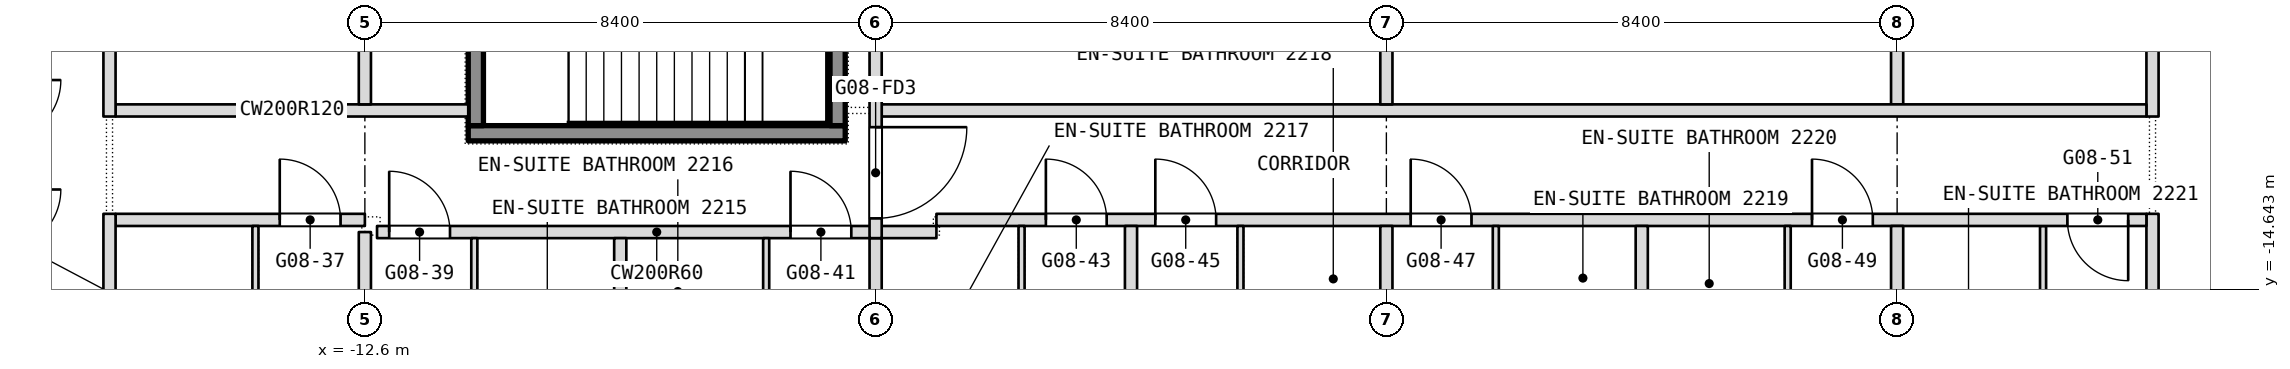
"""IFC4 building model, lengths in metres.
Left out: names, types, materials, properties, quantities, classifications, styles, units other than length and angle.
Written with IfcOpenShell. Run it as: python <this file> out.ifc"""

import sys

from ifc_helpers import new_model, si_unit, direction, frame, frame_2d, origin, place, context, subcontext, project, spatial, rectangle, extrude, element, fill, save


model = new_model("IFC4")
c1 = context("Model", 3, precision=1e-05, world=origin(), true_north=direction((0.0, 1.0)))
c2 = subcontext(c1, "Body", "Model", "MODEL_VIEW")
j1 = project(units=[si_unit("LENGTHUNIT", "METRE"), si_unit("PLANEANGLEUNIT", "RADIAN")], contexts=[c1])
p1 = place(None, origin())
s1 = spatial("IfcSite", under=j1, at=p1, CompositionType="ELEMENT")
p2 = place(p1, origin())
s2 = spatial("IfcBuilding", under=s1, at=p2, CompositionType="ELEMENT")
p3 = place(p2, frame((0.0, 0.0, 104.9)))
s3 = spatial("IfcBuildingStorey", under=s2, at=p3, CompositionType="ELEMENT", Elevation=104.9)
p4 = place(p3, frame((16.8, -22.186, 0.0), z_axis=(0.0, 0.0, 1.0), x_axis=(0.0, 1.0, 0.0)))
e1 = element("IfcWall", 1, at=p4, inside=s3, PredefinedType="PARTITIONING", context=c2, shape_type="SweptSolid", body=[
    extrude(rectangle(XDim=8.786, YDim=0.2, at=frame_2d((4.393, 0.0))), origin(), (0.0, 0.0, 1.0), 3.34),
])
p5 = place(p3, frame((16.8, -11.8, 0.0), z_axis=(0.0, 0.0, 1.0), x_axis=(0.0, 1.0, 0.0)))
e2 = element("IfcWall", 2, at=p5, inside=s3, PredefinedType="PARTITIONING", context=c2, shape_type="SweptSolid", body=[
    extrude(rectangle(XDim=9.9, YDim=0.2, at=frame_2d((4.95, 0.0))), origin(), (0.0, 0.0, 1.0), 3.34),
])
p6 = place(p3, frame((15.0, -16.85, 0.0), z_axis=(0.0, 0.0, 1.0), x_axis=(0.0, 1.0, 0.0)))
e3 = element("IfcWall", 3, at=p6, inside=s3, PredefinedType="PARTITIONING", context=c2, shape_type="SweptSolid", body=[
    extrude(rectangle(XDim=3.25, YDim=0.1, at=frame_2d((1.625, 0.0))), origin(), (0.0, 0.0, 1.0), 3.34),
])
p7 = place(p3, frame((-12.4, -13.7, 0.0), z_axis=(0.0, 0.0, 1.0), x_axis=(1.0, 0.0, 0.0)))
e4 = element("IfcWall", 4, at=p7, inside=s3, PredefinedType="PARTITIONING", context=c2, shape_type="SweptSolid", body=[
    extrude(rectangle(XDim=9.2, YDim=0.2, at=frame_2d((4.6, 0.0))), origin(), (0.0, 0.0, 1.0), 3.34),
])
p8 = place(p7, frame((0.2, 0.0, 0.0)))
e5 = element("IfcOpeningElement", 5, at=p8, cuts=e4, PredefinedType="OPENING", context=c2, shape_type="SweptSolid", body=[
    extrude(rectangle(XDim=1.0, YDim=2.1, at=frame_2d((0.5, 1.05))), frame((0.0, 0.1, 0.0), z_axis=(0.0, -1.0, 0.0), x_axis=(1.0, 0.0, 0.0)), (0.0, 0.0, 1.0), 0.2),
])
p9 = place(p7, frame((6.8, 0.0, 0.0)))
e6 = element("IfcOpeningElement", 6, at=p9, cuts=e4, PredefinedType="OPENING", context=c2, shape_type="SweptSolid", body=[
    extrude(rectangle(XDim=1.0, YDim=2.1, at=frame_2d((0.5, 1.05))), frame((0.0, 0.1, 0.0), z_axis=(0.0, -1.0, 0.0), x_axis=(1.0, 0.0, 0.0)), (0.0, 0.0, 1.0), 0.2),
])
p10 = place(p3, frame((-16.7, -13.5, 0.0), z_axis=(0.0, 0.0, 1.0), x_axis=(1.0, 0.0, 0.0)))
e7 = element("IfcWall", 7, at=p10, inside=s3, PredefinedType="PARTITIONING", context=c2, shape_type="SweptSolid", body=[
    extrude(rectangle(XDim=4.1, YDim=0.2, at=frame_2d((2.05, 0.0))), origin(), (0.0, 0.0, 1.0), 3.34),
])
p11 = place(p10, frame((2.7, 0.0, 0.0)))
e8 = element("IfcOpeningElement", 8, at=p11, cuts=e7, PredefinedType="OPENING", context=c2, shape_type="SweptSolid", body=[
    extrude(rectangle(XDim=1.0, YDim=2.1, at=frame_2d((0.5, 1.05))), frame((0.0, 0.1, 0.0), z_axis=(0.0, -1.0, 0.0), x_axis=(1.0, 0.0, 0.0)), (0.0, 0.0, 1.0), 0.2),
])
p12 = place(p3, frame((-3.2, -13.5, 0.0), z_axis=(0.0, 0.0, 1.0), x_axis=(1.0, 0.0, 0.0)))
e9 = element("IfcWall", 9, at=p12, inside=s3, PredefinedType="PARTITIONING", context=c2, shape_type="SweptSolid", body=[
    extrude(rectangle(XDim=19.9, YDim=0.2, at=frame_2d((9.95, 0.0))), origin(), (0.0, 0.0, 1.0), 3.34),
])
p13 = place(p12, frame((1.8, 0.0, 0.0)))
e10 = element("IfcOpeningElement", 10, at=p13, cuts=e9, PredefinedType="OPENING", context=c2, shape_type="SweptSolid", body=[
    extrude(rectangle(XDim=1.0, YDim=2.1, at=frame_2d((0.5, 1.05))), frame((0.0, 0.1, 0.0), z_axis=(0.0, -1.0, 0.0), x_axis=(1.0, 0.0, 0.0)), (0.0, 0.0, 1.0), 0.2),
])
p14 = place(p12, frame((3.6, 0.0, 0.0)))
e11 = element("IfcOpeningElement", 11, at=p14, cuts=e9, PredefinedType="OPENING", context=c2, shape_type="SweptSolid", body=[
    extrude(rectangle(XDim=1.0, YDim=2.1, at=frame_2d((0.5, 1.05))), frame((0.0, 0.1, 0.0), z_axis=(0.0, -1.0, 0.0), x_axis=(1.0, 0.0, 0.0)), (0.0, 0.0, 1.0), 0.2),
])
p15 = place(p12, frame((7.8, 0.0, 0.0)))
e12 = element("IfcOpeningElement", 12, at=p15, cuts=e9, PredefinedType="OPENING", context=c2, shape_type="SweptSolid", body=[
    extrude(rectangle(XDim=1.0, YDim=2.1, at=frame_2d((0.5, 1.05))), frame((0.0, 0.1, 0.0), z_axis=(0.0, -1.0, 0.0), x_axis=(1.0, 0.0, 0.0)), (0.0, 0.0, 1.0), 0.2),
])
p16 = place(p12, frame((14.4, 0.0, 0.0)))
e13 = element("IfcOpeningElement", 13, at=p16, cuts=e9, PredefinedType="OPENING", context=c2, shape_type="SweptSolid", body=[
    extrude(rectangle(XDim=1.0, YDim=2.1, at=frame_2d((0.5, 1.05))), frame((0.0, 0.1, 0.0), z_axis=(0.0, -1.0, 0.0), x_axis=(1.0, 0.0, 0.0)), (0.0, 0.0, 1.0), 0.2),
])
p17 = place(p12, frame((18.6, 0.0, 0.0)))
e14 = element("IfcOpeningElement", 14, at=p17, cuts=e9, PredefinedType="OPENING", context=c2, shape_type="SweptSolid", body=[
    extrude(rectangle(XDim=1.0, YDim=2.1, at=frame_2d((0.5, 1.05))), frame((0.0, 0.1, 0.0), z_axis=(0.0, -1.0, 0.0), x_axis=(1.0, 0.0, 0.0)), (0.0, 0.0, 1.0), 0.2),
])
p18 = place(p3, frame((12.6, -21.175, 0.0), z_axis=(0.0, 0.0, 1.0), x_axis=(0.0, 1.0, 0.0)))
e15 = element("IfcWall", 15, at=p18, inside=s3, PredefinedType="PARTITIONING", context=c2, shape_type="SweptSolid", body=[
    extrude(rectangle(XDim=7.575, YDim=0.2, at=frame_2d((3.788, 0.0))), origin(), (0.0, 0.0, 1.0), 3.34),
])
p19 = place(p3, frame((12.6, -11.6, 0.0), z_axis=(0.0, 0.0, 1.0), x_axis=(0.0, 1.0, 0.0)))
e16 = element("IfcWall", 16, at=p19, inside=s3, PredefinedType="PARTITIONING", context=c2, shape_type="SweptSolid", body=[
    extrude(rectangle(XDim=3.9, YDim=0.2, at=frame_2d((1.95, 0.0))), origin(), (0.0, 0.0, 1.0), 3.34),
])
p20 = place(p3, frame((-16.7, -11.7, 0.0), z_axis=(0.0, 0.0, 1.0), x_axis=(1.0, 0.0, 0.0)))
e17 = element("IfcWall", 17, at=p20, inside=s3, PredefinedType="PARTITIONING", context=c2, shape_type="SweptSolid", body=[
    extrude(rectangle(XDim=5.8, YDim=0.2, at=frame_2d((2.9, 0.0))), origin(), (0.0, 0.0, 1.0), 3.34),
])
p21 = place(p3, frame((-4.1, -11.7, 0.0), z_axis=(0.0, 0.0, 1.0), x_axis=(1.0, 0.0, 0.0)))
e18 = element("IfcWall", 18, at=p21, inside=s3, PredefinedType="PARTITIONING", context=c2, shape_type="SweptSolid", body=[
    extrude(rectangle(XDim=20.8, YDim=0.2, at=frame_2d((10.4, 0.0))), origin(), (0.0, 0.0, 1.0), 3.34),
])
p22 = place(p3, frame((10.8, -16.45, 0.0), z_axis=(0.0, 0.0, 1.0), x_axis=(0.0, 1.0, 0.0)))
e19 = element("IfcWall", 19, at=p22, inside=s3, PredefinedType="PARTITIONING", context=c2, shape_type="SweptSolid", body=[
    extrude(rectangle(XDim=2.85, YDim=0.1, at=frame_2d((1.425, 0.0))), origin(), (0.0, 0.0, 1.0), 3.34),
])
p23 = place(p3, frame((8.4, -23.3, 0.0), z_axis=(0.0, 0.0, 1.0), x_axis=(0.0, 1.0, 0.0)))
e20 = element("IfcWall", 20, at=p23, inside=s3, PredefinedType="PARTITIONING", context=c2, shape_type="SweptSolid", body=[
    extrude(rectangle(XDim=9.7, YDim=0.2, at=frame_2d((4.85, 0.0))), origin(), (0.0, 0.0, 1.0), 3.34),
])
p24 = place(p3, frame((6.0, -16.35, 0.0), z_axis=(0.0, 0.0, 1.0), x_axis=(0.0, 1.0, 0.0)))
e21 = element("IfcWall", 21, at=p24, inside=s3, PredefinedType="PARTITIONING", context=c2, shape_type="SweptSolid", body=[
    extrude(rectangle(XDim=2.75, YDim=0.1, at=frame_2d((1.375, 0.0))), origin(), (0.0, 0.0, 1.0), 3.34),
])
p25 = place(p3, frame((4.2, -23.3, 0.0), z_axis=(0.0, 0.0, 1.0), x_axis=(0.0, 1.0, 0.0)))
e22 = element("IfcWall", 22, at=p25, inside=s3, PredefinedType="PARTITIONING", context=c2, shape_type="SweptSolid", body=[
    extrude(rectangle(XDim=9.7, YDim=0.2, at=frame_2d((4.85, 0.0))), origin(), (0.0, 0.0, 1.0), 3.34),
])
p26 = place(p3, frame((4.2, -11.6, 0.0), z_axis=(0.0, 0.0, 1.0), x_axis=(0.0, 1.0, 0.0)))
e23 = element("IfcWall", 23, at=p26, inside=s3, PredefinedType="PARTITIONING", context=c2, shape_type="SweptSolid", body=[
    extrude(rectangle(XDim=9.7, YDim=0.2, at=frame_2d((4.85, 0.0))), origin(), (0.0, 0.0, 1.0), 3.34),
])
p27 = place(p3, frame((1.8, -17.45, 0.0), z_axis=(0.0, 0.0, 1.0), x_axis=(0.0, 1.0, 0.0)))
e24 = element("IfcWall", 24, at=p27, inside=s3, PredefinedType="PARTITIONING", context=c2, shape_type="SweptSolid", body=[
    extrude(rectangle(XDim=3.85, YDim=0.1, at=frame_2d((1.925, 0.0))), origin(), (0.0, 0.0, 1.0), 3.34),
])
p28 = place(p27, frame((1.355, 0.0, 0.0)))
e25 = element("IfcOpeningElement", 25, at=p28, cuts=e24, PredefinedType="OPENING", context=c2, shape_type="SweptSolid", body=[
    extrude(rectangle(XDim=0.9, YDim=2.1, at=frame_2d((0.45, 1.05))), frame((0.0, 0.05, 0.0), z_axis=(0.0, -1.0, 0.0), x_axis=(1.0, 0.0, 0.0)), (0.0, 0.0, 1.0), 0.1),
])
p29 = place(p3, frame((0.0, -23.3, 0.0), z_axis=(0.0, 0.0, 1.0), x_axis=(0.0, 1.0, 0.0)))
e26 = element("IfcWall", 26, at=p29, inside=s3, PredefinedType="PARTITIONING", context=c2, shape_type="SweptSolid", body=[
    extrude(rectangle(XDim=9.7, YDim=0.2, at=frame_2d((4.85, 0.0))), origin(), (0.0, 0.0, 1.0), 3.34),
])
p30 = place(p3, frame((-1.8, -17.35, 0.0), z_axis=(0.0, 0.0, 1.0), x_axis=(0.0, 1.0, 0.0)))
e27 = element("IfcWall", 27, at=p30, inside=s3, PredefinedType="PARTITIONING", context=c2, shape_type="SweptSolid", body=[
    extrude(rectangle(XDim=3.75, YDim=0.1, at=frame_2d((1.875, 0.0))), origin(), (0.0, 0.0, 1.0), 3.34),
])
p31 = place(p3, frame((-4.2, -23.3, 0.0), z_axis=(0.0, 0.0, 1.0), x_axis=(0.0, 1.0, 0.0)))
e28 = element("IfcWall", 28, at=p31, inside=s3, PredefinedType="PARTITIONING", context=c2, shape_type="SweptSolid", body=[
    extrude(rectangle(XDim=9.5, YDim=0.2, at=frame_2d((4.75, 0.0))), origin(), (0.0, 0.0, 1.0), 3.34),
])
p32 = place(p3, frame((-4.2, -13.8, 0.0), z_axis=(0.0, 0.0, 1.0), x_axis=(0.0, 1.0, 0.0)))
e29 = element("IfcWall", 29, at=p32, inside=s3, PredefinedType="PARTITIONING", context=c2, shape_type="SweptSolid", body=[
    extrude(rectangle(XDim=13.8, YDim=0.2, at=frame_2d((6.9, 0.0))), origin(), (0.0, 0.0, 1.0), 3.34),
])
p33 = place(p32, frame((12.15, 0.0, 0.0)))
e30 = element("IfcOpeningElement", 30, at=p33, cuts=e29, PredefinedType="OPENING", context=c2, shape_type="SweptSolid", body=[
    extrude(rectangle(XDim=1.5, YDim=2.1, at=frame_2d((0.75, 1.05))), frame((0.0, 0.1, 0.0), z_axis=(0.0, -1.0, 0.0), x_axis=(1.0, 0.0, 0.0)), (0.0, 0.0, 1.0), 0.2),
])
p34 = place(p32, frame((0.325, 0.0, 0.0)))
e31 = element("IfcOpeningElement", 31, at=p34, cuts=e29, PredefinedType="OPENING", context=c2, shape_type="SweptSolid", body=[
    extrude(rectangle(XDim=1.5, YDim=2.1, at=frame_2d((0.75, 1.05))), frame((0.0, 0.1, 0.0), z_axis=(0.0, -1.0, 0.0), x_axis=(1.0, 0.0, 0.0)), (0.0, 0.0, 1.0), 0.2),
])
p35 = place(p3, frame((-6.0, -16.45, 0.0), z_axis=(0.0, 0.0, 1.0), x_axis=(0.0, 1.0, 0.0)))
e32 = element("IfcWall", 32, at=p35, inside=s3, PredefinedType="PARTITIONING", context=c2, shape_type="SweptSolid", body=[
    extrude(rectangle(XDim=2.65, YDim=0.1, at=frame_2d((1.325, 0.0))), origin(), (0.0, 0.0, 1.0), 3.34),
])
p36 = place(p3, frame((-8.4, -23.3, 0.0), z_axis=(0.0, 0.0, 1.0), x_axis=(0.0, 1.0, 0.0)))
e33 = element("IfcWall", 33, at=p36, inside=s3, PredefinedType="PARTITIONING", context=c2, shape_type="SweptSolid", body=[
    extrude(rectangle(XDim=9.5, YDim=0.2, at=frame_2d((4.75, 0.0))), origin(), (0.0, 0.0, 1.0), 3.34),
])
p37 = place(p3, frame((-10.8, -17.65, 0.0), z_axis=(0.0, 0.0, 1.0), x_axis=(0.0, 1.0, 0.0)))
e34 = element("IfcWall", 34, at=p37, inside=s3, PredefinedType="PARTITIONING", context=c2, shape_type="SweptSolid", body=[
    extrude(rectangle(XDim=3.85, YDim=0.1, at=frame_2d((1.925, 0.0))), origin(), (0.0, 0.0, 1.0), 3.34),
])
p38 = place(p3, frame((-12.6, -21.175, 0.0), z_axis=(0.0, 0.0, 1.0), x_axis=(0.0, 1.0, 0.0)))
e35 = element("IfcWall", 35, at=p38, inside=s3, PredefinedType="PARTITIONING", context=c2, shape_type="SweptSolid", body=[
    extrude(rectangle(XDim=7.475, YDim=0.2, at=frame_2d((3.738, 0.0))), origin(), (0.0, 0.0, 1.0), 3.34),
])
p39 = place(p3, frame((-12.6, -11.6, 0.0), z_axis=(0.0, 0.0, 1.0), x_axis=(0.0, 1.0, 0.0)))
e36 = element("IfcWall", 36, at=p39, inside=s3, PredefinedType="PARTITIONING", context=c2, shape_type="SweptSolid", body=[
    extrude(rectangle(XDim=9.7, YDim=0.2, at=frame_2d((4.85, 0.0))), origin(), (0.0, 0.0, 1.0), 3.34),
])
p40 = place(p3, frame((-14.4, -17.65, 0.0), z_axis=(0.0, 0.0, 1.0), x_axis=(0.0, 1.0, 0.0)))
e37 = element("IfcWall", 37, at=p40, inside=s3, PredefinedType="PARTITIONING", context=c2, shape_type="SweptSolid", body=[
    extrude(rectangle(XDim=4.05, YDim=0.1, at=frame_2d((2.025, 0.0))), origin(), (0.0, 0.0, 1.0), 3.34),
])
p41 = place(p3, frame((-16.8, -22.186, 0.0), z_axis=(0.0, 0.0, 1.0), x_axis=(0.0, 1.0, 0.0)))
e38 = element("IfcWall", 38, at=p41, inside=s3, PredefinedType="PARTITIONING", context=c2, shape_type="SweptSolid", body=[
    extrude(rectangle(XDim=8.786, YDim=0.2, at=frame_2d((4.393, 0.0))), origin(), (0.0, 0.0, 1.0), 3.34),
])
p42 = place(p3, frame((-16.8, -11.8, 0.0), z_axis=(0.0, 0.0, 1.0), x_axis=(0.0, 1.0, 0.0)))
e39 = element("IfcWall", 39, at=p42, inside=s3, PredefinedType="PARTITIONING", context=c2, shape_type="SweptSolid", body=[
    extrude(rectangle(XDim=9.9, YDim=0.2, at=frame_2d((4.95, 0.0))), origin(), (0.0, 0.0, 1.0), 3.34),
])
p43 = place(p3, frame((-10.9, -12.075, 0.1), z_axis=(0.0, 0.0, 1.0), x_axis=(1.0, 0.0, 0.0)))
e40 = element("IfcWall", 40, at=p43, inside=s3, PredefinedType="SHEAR", context=c2, shape_type="SweptSolid", body=[
    extrude(rectangle(XDim=6.2, YDim=0.25, at=frame_2d((3.1, 0.0))), origin(), (0.0, 0.0, 1.0), 3.6),
])
for number, where, z_axis, x_axis in (
    (41, (-10.775, -11.95, 0.1), (0.0, 0.0, 1.0), (0.0, 1.0, 0.0)),
    (42, (-4.825, -11.95, 0.1), (0.0, 0.0, 1.0), (0.0, 1.0, 0.0)),
):
    element("IfcWall", number, at=place(p3, frame(where, z_axis=z_axis, x_axis=x_axis)), inside=s3, PredefinedType="SHEAR", context=c2, shape_type="SweptSolid", body=[
        extrude(rectangle(XDim=2.9, YDim=0.25, at=frame_2d((1.45, 0.0))), origin(), (0.0, 0.0, 1.0), 3.6),
    ])
p44 = place(p8, origin())
e43 = element("IfcDoor", 43, at=p44, inside=s3, OperationType="SINGLE_SWING_RIGHT", PredefinedType="DOOR", context=c2, shape_type="SweptSolid", body=[
    extrude(rectangle(XDim=1.0, YDim=2.1, at=frame_2d((0.5, 1.05))), frame((0.0, 0.025, 0.0), z_axis=(0.0, -1.0, 0.0), x_axis=(1.0, 0.0, 0.0)), (0.0, 0.0, 1.0), 0.05),
])
fill(e5, e43)
p45 = place(p9, origin())
e44 = element("IfcDoor", 44, at=p45, inside=s3, OperationType="SINGLE_SWING_LEFT", PredefinedType="DOOR", context=c2, shape_type="SweptSolid", body=[
    extrude(rectangle(XDim=1.0, YDim=2.1, at=frame_2d((0.5, 1.05))), frame((0.0, 0.025, 0.0), z_axis=(0.0, -1.0, 0.0), x_axis=(1.0, 0.0, 0.0)), (0.0, 0.0, 1.0), 0.05),
])
fill(e6, e44)
p46 = place(p11, origin())
e45 = element("IfcDoor", 45, at=p46, inside=s3, OperationType="SINGLE_SWING_LEFT", PredefinedType="DOOR", context=c2, shape_type="SweptSolid", body=[
    extrude(rectangle(XDim=1.0, YDim=2.1, at=frame_2d((0.5, 1.05))), frame((0.0, 0.025, 0.0), z_axis=(0.0, -1.0, 0.0), x_axis=(1.0, 0.0, 0.0)), (0.0, 0.0, 1.0), 0.05),
])
fill(e8, e45)
p47 = place(p13, origin())
e46 = element("IfcDoor", 46, at=p47, inside=s3, OperationType="SINGLE_SWING_LEFT", PredefinedType="DOOR", context=c2, shape_type="SweptSolid", body=[
    extrude(rectangle(XDim=1.0, YDim=2.1, at=frame_2d((0.5, 1.05))), frame((0.0, 0.025, 0.0), z_axis=(0.0, -1.0, 0.0), x_axis=(1.0, 0.0, 0.0)), (0.0, 0.0, 1.0), 0.05),
])
fill(e10, e46)
p48 = place(p14, origin())
e47 = element("IfcDoor", 47, at=p48, inside=s3, OperationType="SINGLE_SWING_LEFT", PredefinedType="DOOR", context=c2, shape_type="SweptSolid", body=[
    extrude(rectangle(XDim=1.0, YDim=2.1, at=frame_2d((0.5, 1.05))), frame((0.0, 0.025, 0.0), z_axis=(0.0, -1.0, 0.0), x_axis=(1.0, 0.0, 0.0)), (0.0, 0.0, 1.0), 0.05),
])
fill(e11, e47)
p49 = place(p15, origin())
e48 = element("IfcDoor", 48, at=p49, inside=s3, OperationType="SINGLE_SWING_LEFT", PredefinedType="DOOR", context=c2, shape_type="SweptSolid", body=[
    extrude(rectangle(XDim=1.0, YDim=2.1, at=frame_2d((0.5, 1.05))), frame((0.0, 0.025, 0.0), z_axis=(0.0, -1.0, 0.0), x_axis=(1.0, 0.0, 0.0)), (0.0, 0.0, 1.0), 0.05),
])
fill(e12, e48)
p50 = place(p16, origin())
e49 = element("IfcDoor", 49, at=p50, inside=s3, OperationType="SINGLE_SWING_LEFT", PredefinedType="DOOR", context=c2, shape_type="SweptSolid", body=[
    extrude(rectangle(XDim=1.0, YDim=2.1, at=frame_2d((0.5, 1.05))), frame((0.0, 0.025, 0.0), z_axis=(0.0, -1.0, 0.0), x_axis=(1.0, 0.0, 0.0)), (0.0, 0.0, 1.0), 0.05),
])
fill(e13, e49)
p51 = place(p17, origin())
e50 = element("IfcDoor", 50, at=p51, inside=s3, OperationType="SINGLE_SWING_LEFT", PredefinedType="DOOR", context=c2, shape_type="SweptSolid", body=[
    extrude(rectangle(XDim=1.0, YDim=2.1, at=frame_2d((0.5, 1.05))), frame((0.0, 0.025, 0.0), z_axis=(0.0, -1.0, 0.0), x_axis=(1.0, 0.0, 0.0)), (0.0, 0.0, 1.0), 0.05),
])
fill(e14, e50)
p52 = place(p34, origin())
e51 = element("IfcDoor", 51, at=p52, inside=s3, OperationType="DOUBLE_DOOR_DOUBLE_SWING", PredefinedType="DOOR", context=c2, shape_type="SweptSolid", body=[
    extrude(rectangle(XDim=1.5, YDim=2.1, at=frame_2d((0.75, 1.05))), frame((0.0, 0.025, 0.0), z_axis=(0.0, -1.0, 0.0), x_axis=(1.0, 0.0, 0.0)), (0.0, 0.0, 1.0), 0.05),
])
fill(e31, e51)
save(model, sys.argv[1])
